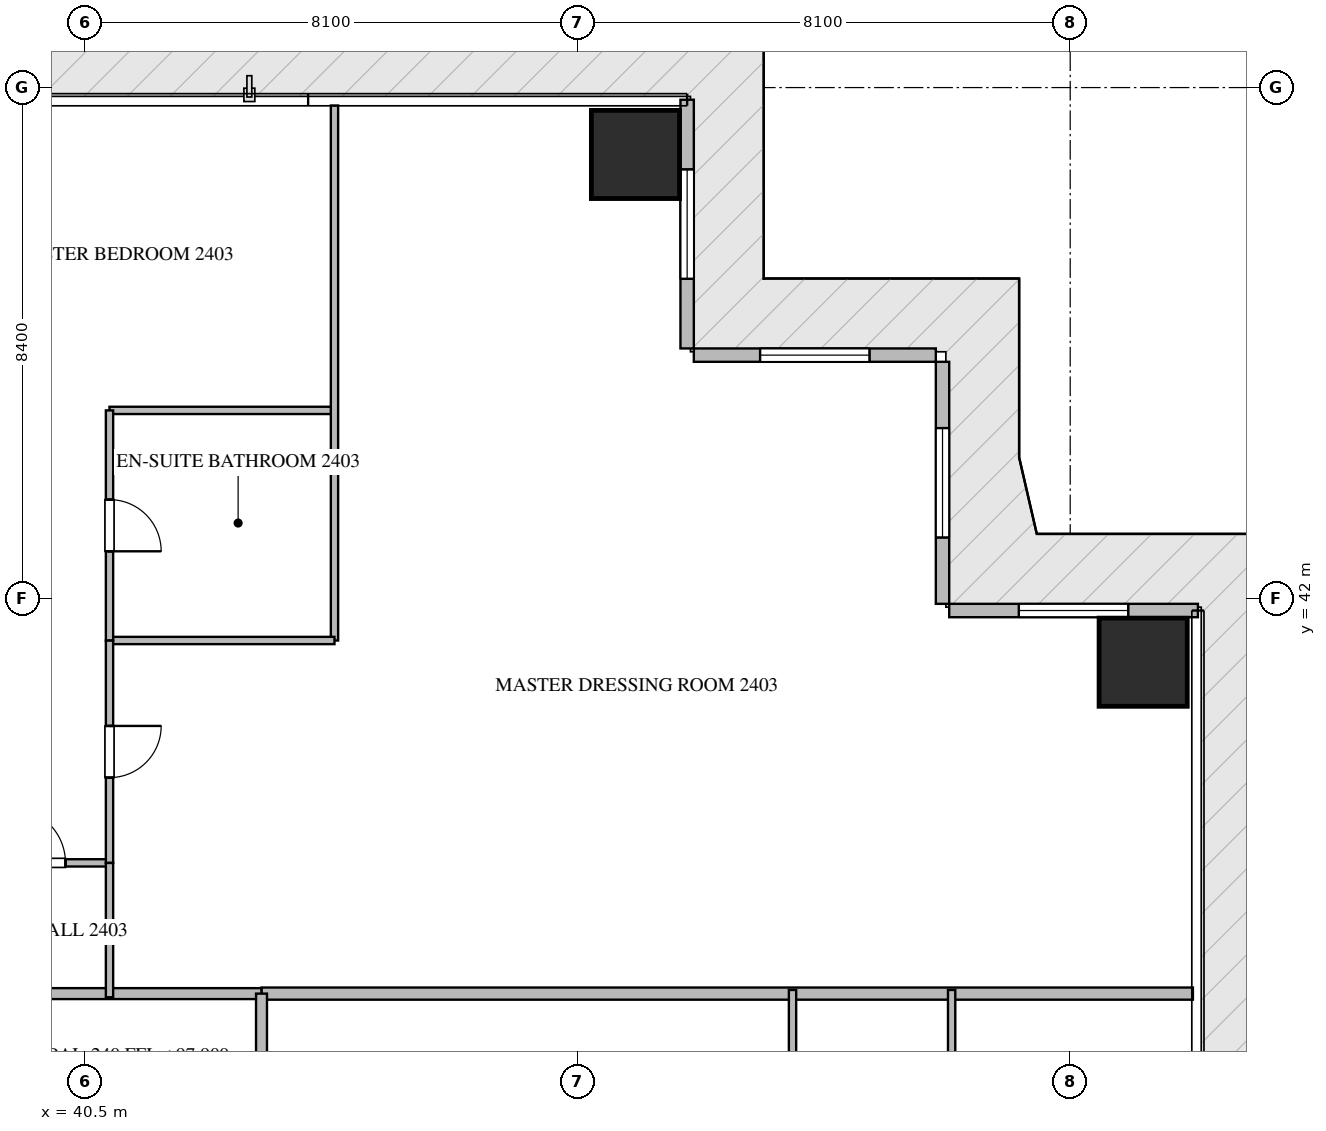
"""IFC4 building model, lengths in metres.
Left out: names, types, materials, properties, quantities, classifications, styles, units other than length and angle.
Written with IfcOpenShell. Run it as: python <this file> out.ifc"""

import sys

from ifc_helpers import new_model, si_unit, direction, frame, frame_2d, origin, origin_2d, place, context, subcontext, project, spatial, rectangle, extrude, source, transform, mapped, element, fill, save


model = new_model("IFC4")
c1 = context("Model", 3, precision=1e-05, world=origin(), true_north=direction((0.0, 1.0)))
c2 = subcontext(c1, "Body", "Model", "MODEL_VIEW")
j1 = project(units=[si_unit("LENGTHUNIT", "METRE"), si_unit("PLANEANGLEUNIT", "RADIAN")], contexts=[c1])
p1 = place(None, origin())
s1 = spatial("IfcSite", under=j1, at=p1, CompositionType="ELEMENT")
p2 = place(p1, origin())
s2 = spatial("IfcBuilding", under=s1, at=p2, CompositionType="ELEMENT")
p3 = place(p2, frame((0.0, 0.0, 97.95)))
s3 = spatial("IfcBuildingStorey", under=s2, at=p3, CompositionType="ELEMENT", Elevation=97.95)
m1 = source(origin(), c2, "Body", "SweptSolid", [
    extrude(rectangle(XDim=1.45, YDim=1.45, at=origin_2d()), origin(), (0.0, 0.0, 1.0), 3.75),
])
for number, where, z_axis, x_axis in (
    (1, (49.55, 49.3, -0.26), (0.0, 0.0, 1.0), (1.0, 0.0, 0.0)),
    (2, (57.9, 40.95, -0.26), (0.0, 0.0, 1.0), (1.0, 0.0, 0.0)),
):
    element("IfcColumn", number, at=place(p3, frame(where, z_axis=z_axis, x_axis=x_axis)), inside=s3, PredefinedType="COLUMN", context=c2, shape_type="MappedRepresentation", body=[
        mapped(m1, transform((0.0, 0.0, 0.0), scale=1.0)),
    ])
p4 = place(p3, frame((58.8, 41.8, 0.0), z_axis=(0.0, 0.0, 1.0), x_axis=(-1.0, 0.0, 0.0)))
e3 = element("IfcWall", 3, at=p4, inside=s3, PredefinedType="ELEMENTEDWALL", context=c2, shape_type="SweptSolid", body=[
    extrude(rectangle(XDim=4.09, YDim=0.22, at=frame_2d((2.045, 0.0))), origin(), (0.0, 0.0, 1.0), 3.475),
])
p5 = place(p4, frame((1.145, 0.0, 0.65)))
e4 = element("IfcOpeningElement", 4, at=p5, cuts=e3, PredefinedType="OPENING", context=c2, shape_type="SweptSolid", body=[
    extrude(rectangle(XDim=1.8, YDim=2.1, at=frame_2d((0.9, 1.05))), frame((0.0, 0.12, 0.0), z_axis=(0.0, -1.0, 0.0), x_axis=(1.0, 0.0, 0.0)), (0.0, 0.0, 1.0), 0.24),
])
p6 = place(p3, frame((54.6, 41.91, 0.0), z_axis=(0.0, 0.0, 1.0), x_axis=(0.0, 1.0, 0.0)))
e5 = element("IfcWall", 5, at=p6, inside=s3, PredefinedType="ELEMENTEDWALL", context=c2, shape_type="SweptSolid", body=[
    extrude(rectangle(XDim=3.98, YDim=0.22, at=frame_2d((1.99, 0.0))), origin(), (0.0, 0.0, 1.0), 3.475),
])
p7 = place(p6, frame((1.09, 0.0, 0.65)))
e6 = element("IfcOpeningElement", 6, at=p7, cuts=e5, PredefinedType="OPENING", context=c2, shape_type="SweptSolid", body=[
    extrude(rectangle(XDim=1.8, YDim=2.1, at=frame_2d((0.9, 1.05))), frame((0.0, 0.12, 0.0), z_axis=(0.0, -1.0, 0.0), x_axis=(1.0, 0.0, 0.0)), (0.0, 0.0, 1.0), 0.24),
])
p8 = place(p3, frame((54.49, 46.0, 0.0), z_axis=(0.0, 0.0, 1.0), x_axis=(-1.0, 0.0, 0.0)))
e7 = element("IfcWall", 7, at=p8, inside=s3, PredefinedType="ELEMENTEDWALL", context=c2, shape_type="SweptSolid", body=[
    extrude(rectangle(XDim=3.98, YDim=0.22, at=frame_2d((1.99, 0.0))), origin(), (0.0, 0.0, 1.0), 3.475),
])
p9 = place(p8, frame((1.09, 0.0, 0.65)))
e8 = element("IfcOpeningElement", 8, at=p9, cuts=e7, PredefinedType="OPENING", context=c2, shape_type="SweptSolid", body=[
    extrude(rectangle(XDim=1.8, YDim=2.1, at=frame_2d((0.9, 1.05))), frame((0.0, 0.12, 0.0), z_axis=(0.0, -1.0, 0.0), x_axis=(1.0, 0.0, 0.0)), (0.0, 0.0, 1.0), 0.24),
])
p10 = place(p3, frame((50.4, 46.11, 0.0), z_axis=(0.0, 0.0, 1.0), x_axis=(0.0, 1.0, 0.0)))
e9 = element("IfcWall", 9, at=p10, inside=s3, PredefinedType="ELEMENTEDWALL", context=c2, shape_type="SweptSolid", body=[
    extrude(rectangle(XDim=4.09, YDim=0.22, at=frame_2d((2.045, 0.0))), origin(), (0.0, 0.0, 1.0), 3.475),
])
p11 = place(p10, frame((1.145, 0.0, 0.65)))
e10 = element("IfcOpeningElement", 10, at=p11, cuts=e9, PredefinedType="OPENING", context=c2, shape_type="SweptSolid", body=[
    extrude(rectangle(XDim=1.8, YDim=2.1, at=frame_2d((0.9, 1.05))), frame((0.0, 0.12, 0.0), z_axis=(0.0, -1.0, 0.0), x_axis=(1.0, 0.0, 0.0)), (0.0, 0.0, 1.0), 0.24),
])
p12 = place(p3, frame((43.4, 35.5, 0.0), z_axis=(0.0, 0.0, 1.0), x_axis=(1.0, 0.0, 0.0)))
e11 = element("IfcWall", 11, at=p12, inside=s3, PredefinedType="PARTITIONING", context=c2, shape_type="SweptSolid", body=[
    extrude(rectangle(XDim=15.318, YDim=0.2, at=frame_2d((7.659, 0.0))), origin(), (0.0, 0.0, 1.0), 3.49),
])
p13 = place(p3, frame((21.402, 35.5, 0.0), z_axis=(0.0, 0.0, 1.0), x_axis=(1.0, 0.0, 0.0)))
e12 = element("IfcWall", 12, at=p13, inside=s3, PredefinedType="PARTITIONING", context=c2, shape_type="SweptSolid", body=[
    extrude(rectangle(XDim=21.996, YDim=0.18, at=frame_2d((10.998, 0.0))), origin(), (0.0, 0.0, 1.0), 3.49),
])
p14 = place(p13, frame((7.202, 0.0, 0.0)))
e13 = element("IfcOpeningElement", 13, at=p14, cuts=e12, PredefinedType="OPENING", context=c2, shape_type="SweptSolid", body=[
    extrude(rectangle(XDim=1.0, YDim=2.15, at=frame_2d((0.5, 1.075))), frame((0.0, 0.1, 0.0), z_axis=(0.0, -1.0, 0.0), x_axis=(1.0, 0.0, 0.0)), (0.0, 0.0, 1.0), 0.2),
])
p15 = place(p3, frame((43.4, 14.9, 0.0), z_axis=(0.0, 0.0, 1.0), x_axis=(0.0, 1.0, 0.0)))
e14 = element("IfcWall", 14, at=p15, inside=s3, PredefinedType="PARTITIONING", context=c2, shape_type="SweptSolid", body=[
    extrude(rectangle(XDim=20.6, YDim=0.18, at=frame_2d((10.3, 0.0))), origin(), (0.0, 0.0, 1.0), 3.49),
])
p16 = place(p15, frame((1.96, 0.0, 0.0)))
e15 = element("IfcOpeningElement", 15, at=p16, cuts=e14, PredefinedType="OPENING", context=c2, shape_type="SweptSolid", body=[
    extrude(rectangle(XDim=1.0, YDim=2.15, at=frame_2d((0.5, 1.075))), frame((0.0, 0.1, 0.0), z_axis=(0.0, -1.0, 0.0), x_axis=(1.0, 0.0, 0.0)), (0.0, 0.0, 1.0), 0.2),
])
p17 = place(p3, frame((38.552, 37.65, 0.0), z_axis=(0.0, 0.0, 1.0), x_axis=(1.0, 0.0, 0.0)))
e16 = element("IfcWall", 16, at=p17, inside=s3, PredefinedType="PARTITIONING", context=c2, shape_type="SweptSolid", body=[
    extrude(rectangle(XDim=2.348, YDim=0.12, at=frame_2d((1.174, 0.0))), origin(), (0.0, 0.0, 1.0), 3.49),
])
p18 = place(p17, frame((0.724, 0.0, 0.0)))
e17 = element("IfcOpeningElement", 17, at=p18, cuts=e16, PredefinedType="OPENING", context=c2, shape_type="SweptSolid", body=[
    extrude(rectangle(XDim=0.9, YDim=2.1, at=frame_2d((0.45, 1.05))), frame((0.0, 0.07, 0.0), z_axis=(0.0, -1.0, 0.0), x_axis=(1.0, 0.0, 0.0)), (0.0, 0.0, 1.0), 0.14),
])
p19 = place(p3, frame((40.9, 45.091, 0.0), z_axis=(0.0, 0.0, 1.0), x_axis=(1.0, 0.0, 0.0)))
e18 = element("IfcWall", 18, at=p19, inside=s3, PredefinedType="PARTITIONING", context=c2, shape_type="SweptSolid", body=[
    extrude(rectangle(XDim=3.7, YDim=0.12, at=frame_2d((1.85, 0.0))), origin(), (0.0, 0.0, 1.0), 3.49),
])
p20 = place(p3, frame((44.6, 50.105, 0.0), z_axis=(0.0, 0.0, 1.0), x_axis=(0.0, -1.0, 0.0)))
e19 = element("IfcWall", 19, at=p20, inside=s3, PredefinedType="PARTITIONING", context=c2, shape_type="SweptSolid", body=[
    extrude(rectangle(XDim=8.798, YDim=0.12, at=frame_2d((4.399, 0.0))), origin(), (0.0, 0.0, 1.0), 3.49),
])
p21 = place(p3, frame((40.9, 41.307, 0.0), z_axis=(0.0, 0.0, 1.0), x_axis=(1.0, 0.0, 0.0)))
e20 = element("IfcWall", 20, at=p21, inside=s3, PredefinedType="PARTITIONING", context=c2, shape_type="SweptSolid", body=[
    extrude(rectangle(XDim=3.7, YDim=0.12, at=frame_2d((1.85, 0.0))), origin(), (0.0, 0.0, 1.0), 3.49),
])
p22 = place(p3, frame((40.9, 45.091, 0.0), z_axis=(0.0, 0.0, 1.0), x_axis=(0.0, -1.0, 0.0)))
e21 = element("IfcWall", 21, at=p22, inside=s3, PredefinedType="PARTITIONING", context=c2, shape_type="SweptSolid", body=[
    extrude(rectangle(XDim=3.784, YDim=0.12, at=frame_2d((1.892, 0.0))), origin(), (0.0, 0.0, 1.0), 3.49),
])
p23 = place(p22, frame((1.467, 0.0, 0.0)))
e22 = element("IfcOpeningElement", 22, at=p23, cuts=e21, PredefinedType="OPENING", context=c2, shape_type="SweptSolid", body=[
    extrude(rectangle(XDim=0.85, YDim=2.1, at=frame_2d((0.425, 1.05))), frame((0.0, 0.07, 0.0), z_axis=(0.0, -1.0, 0.0), x_axis=(1.0, 0.0, 0.0)), (0.0, 0.0, 1.0), 0.14),
])
p24 = place(p3, frame((40.9, 41.305, 0.0), z_axis=(0.0, 0.0, 1.0), x_axis=(0.0, -1.0, 0.0)))
e23 = element("IfcWall", 23, at=p24, inside=s3, PredefinedType="PARTITIONING", context=c2, shape_type="SweptSolid", body=[
    extrude(rectangle(XDim=3.655, YDim=0.12, at=frame_2d((1.828, 0.0))), origin(), (0.0, 0.0, 1.0), 3.49),
])
p25 = place(p24, frame((1.403, 0.0, 0.0)))
e24 = element("IfcOpeningElement", 24, at=p25, cuts=e23, PredefinedType="OPENING", context=c2, shape_type="SweptSolid", body=[
    extrude(rectangle(XDim=0.85, YDim=2.1, at=frame_2d((0.425, 1.05))), frame((0.0, 0.07, 0.0), z_axis=(0.0, -1.0, 0.0), x_axis=(1.0, 0.0, 0.0)), (0.0, 0.0, 1.0), 0.14),
])
p26 = place(p3, frame((40.9, 37.648, 0.0), z_axis=(0.0, 0.0, 1.0), x_axis=(0.0, -1.0, 0.0)))
e25 = element("IfcWall", 25, at=p26, inside=s3, PredefinedType="PARTITIONING", context=c2, shape_type="SweptSolid", body=[
    extrude(rectangle(XDim=2.208, YDim=0.12, at=frame_2d((1.104, 0.0))), origin(), (0.0, 0.0, 1.0), 3.49),
])
for number, where, z_axis, x_axis in (
    (26, (54.75, 30.15, 0.0), (0.0, 0.0, 1.0), (0.0, 1.0, 0.0)),
    (27, (52.133, 30.15, 0.0), (0.0, 0.0, 1.0), (0.0, 1.0, 0.0)),
):
    element("IfcWall", number, at=place(p3, frame(where, z_axis=z_axis, x_axis=x_axis)), inside=s3, PredefinedType="PARTITIONING", context=c2, shape_type="SweptSolid", body=[
        extrude(rectangle(XDim=5.41, YDim=0.12, at=frame_2d((2.705, 0.0))), origin(), (0.0, 0.0, 1.0), 3.49),
    ])
m2 = source(origin(), c2, "Body", "SweptSolid", [
    extrude(rectangle(XDim=1.8, YDim=2.1, at=frame_2d((0.9, 1.05))), frame((0.0, 0.03, 0.0), z_axis=(0.0, -1.0, 0.0), x_axis=(1.0, 0.0, 0.0)), (0.0, 0.0, 1.0), 0.06),
])
p27 = place(p5, origin())
e28 = element("IfcWindow", 28, at=p27, inside=s3, PartitioningType="SINGLE_PANEL", PredefinedType="WINDOW", context=c2, shape_type="MappedRepresentation", body=[
    mapped(m2, transform((0.0, 0.0, 0.0), scale=1.0)),
])
fill(e4, e28)
p28 = place(p7, origin())
e29 = element("IfcWindow", 29, at=p28, inside=s3, PartitioningType="SINGLE_PANEL", PredefinedType="WINDOW", context=c2, shape_type="MappedRepresentation", body=[
    mapped(m2, transform((0.0, 0.0, 0.0), scale=1.0)),
])
fill(e6, e29)
p29 = place(p9, origin())
e30 = element("IfcWindow", 30, at=p29, inside=s3, PartitioningType="SINGLE_PANEL", PredefinedType="WINDOW", context=c2, shape_type="MappedRepresentation", body=[
    mapped(m2, transform((0.0, 0.0, 0.0), scale=1.0)),
])
fill(e8, e30)
p30 = place(p11, origin())
e31 = element("IfcWindow", 31, at=p30, inside=s3, PartitioningType="SINGLE_PANEL", PredefinedType="WINDOW", context=c2, shape_type="MappedRepresentation", body=[
    mapped(m2, transform((0.0, 0.0, 0.0), scale=1.0)),
])
fill(e10, e31)
m3 = source(origin(), c2, "Body", "SweptSolid", [
    extrude(rectangle(XDim=0.9, YDim=2.1, at=frame_2d((0.45, 1.05))), frame((0.0, 0.025, 0.0), z_axis=(0.0, -1.0, 0.0), x_axis=(1.0, 0.0, 0.0)), (0.0, 0.0, 1.0), 0.05),
])
p31 = place(p18, origin())
e32 = element("IfcDoor", 32, at=p31, inside=s3, OperationType="SINGLE_SWING_LEFT", PredefinedType="DOOR", context=c2, shape_type="MappedRepresentation", body=[
    mapped(m3, transform((0.0, 0.0, 0.0), scale=1.0)),
])
fill(e17, e32)
m4 = source(origin(), c2, "Body", "SweptSolid", [
    extrude(rectangle(XDim=0.85, YDim=2.1, at=frame_2d((0.425, 1.05))), frame((0.0, 0.025, 0.0), z_axis=(0.0, -1.0, 0.0), x_axis=(1.0, 0.0, 0.0)), (0.0, 0.0, 1.0), 0.05),
])
p32 = place(p23, origin())
e33 = element("IfcDoor", 33, at=p32, inside=s3, OperationType="SINGLE_SWING_RIGHT", PredefinedType="DOOR", context=c2, shape_type="MappedRepresentation", body=[
    mapped(m4, transform((0.0, 0.0, 0.0), scale=1.0)),
])
fill(e22, e33)
p33 = place(p25, origin())
e34 = element("IfcDoor", 34, at=p33, inside=s3, OperationType="SINGLE_SWING_LEFT", PredefinedType="DOOR", context=c2, shape_type="MappedRepresentation", body=[
    mapped(m4, transform((0.0, 0.0, 0.0), scale=1.0)),
])
fill(e24, e34)
save(model, sys.argv[1])
